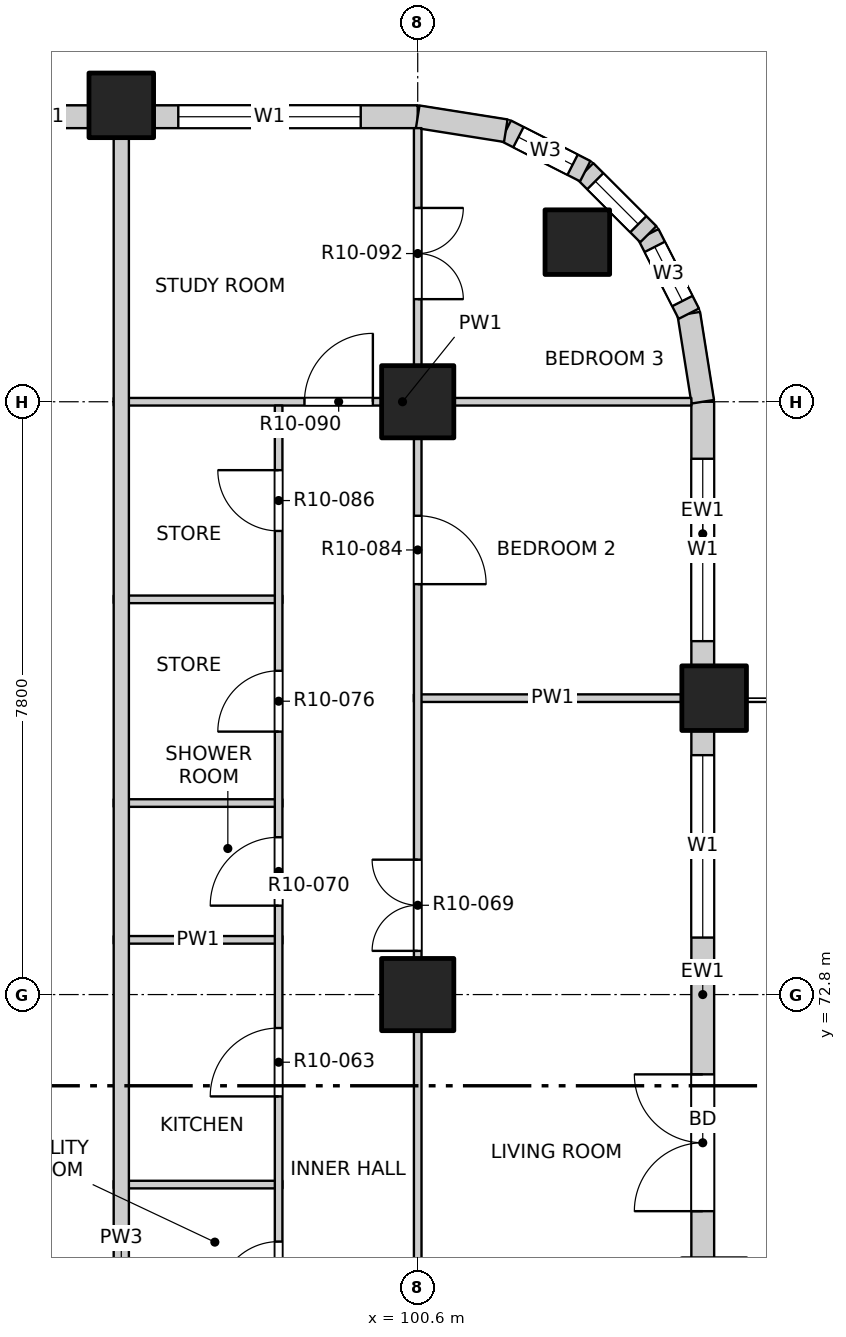
"""IFC4 building model, lengths in metres.
Left out: names, types, materials, properties, quantities, classifications, styles, units other than length and angle.
Written with IfcOpenShell. Run it as: python <this file> out.ifc"""

import sys

from ifc_helpers import new_model, si_unit, direction, frame, frame_2d, origin, origin_2d, place, context, subcontext, project, spatial, rectangle, extrude, element, fill, save


model = new_model("IFC4")
c1 = context("Model", 3, precision=1e-05, world=origin(), true_north=direction((0.0, 1.0)))
c2 = subcontext(c1, "Body", "Model", "MODEL_VIEW")
j1 = project(units=[si_unit("LENGTHUNIT", "METRE"), si_unit("PLANEANGLEUNIT", "RADIAN")], contexts=[c1])
p1 = place(None, origin())
s1 = spatial("IfcSite", under=j1, at=p1, CompositionType="ELEMENT")
p2 = place(p1, origin())
s2 = spatial("IfcBuilding", under=s1, at=p2, CompositionType="ELEMENT")
p3 = place(p2, frame((0.0, 0.0, 127.1)))
s3 = spatial("IfcBuildingStorey", under=s2, at=p3, CompositionType="ELEMENT", Elevation=127.1)
for number, where, z_axis, x_axis in (
    (1, (102.7, 82.7, -0.25), (0.0, 0.0, 1.0), (1.0, 0.0, 0.0)),
    (2, (104.5, 76.7, -0.25), (0.0, 0.0, 1.0), (1.0, 0.0, 0.0)),
    (3, (96.7, 84.5, -0.25), (0.0, 0.0, 1.0), (1.0, 0.0, 0.0)),
):
    element("IfcColumn", number, at=place(p3, frame(where, z_axis=z_axis, x_axis=x_axis)), inside=s3, PredefinedType="COLUMN", context=c2, shape_type="SweptSolid", body=[
        extrude(rectangle(XDim=0.85, YDim=0.85, at=origin_2d()), origin(), (0.0, 0.0, 1.0), 3.4),
    ])
for number, where, z_axis, x_axis in (
    (4, (100.6, 72.8, -0.25), (0.0, 0.0, 1.0), (1.0, 0.0, 0.0)),
    (5, (100.6, 80.6, -0.25), (0.0, 0.0, 1.0), (1.0, 0.0, 0.0)),
):
    element("IfcColumn", number, at=place(p3, frame(where, z_axis=z_axis, x_axis=x_axis)), inside=s3, PredefinedType="COLUMN", context=c2, shape_type="SweptSolid", body=[
        extrude(rectangle(XDim=0.95, YDim=0.95, at=origin_2d()), origin(), (0.0, 0.0, 1.0), 3.4),
    ])
p4 = place(p3, frame((104.35, 69.325, 0.0), z_axis=(0.0, 0.0, 1.0), x_axis=(0.0, 1.0, 0.0)))
e6 = element("IfcWall", 6, at=p4, inside=s3, PredefinedType="SOLIDWALL", context=c2, shape_type="SweptSolid", body=[
    extrude(rectangle(XDim=6.95, YDim=0.3, at=frame_2d((3.475, 0.0))), origin(), (0.0, 0.0, 1.0), 2.7),
])
p5 = place(p4, frame((0.625, 0.0, 0.0)))
e7 = element("IfcOpeningElement", 7, at=p5, cuts=e6, PredefinedType="OPENING", context=c2, shape_type="SweptSolid", body=[
    extrude(rectangle(XDim=1.8, YDim=2.4, at=frame_2d((0.9, 1.2))), frame((0.0, 0.16, 0.0), z_axis=(0.0, -1.0, 0.0), x_axis=(1.0, 0.0, 0.0)), (0.0, 0.0, 1.0), 0.32),
])
p6 = place(p4, frame((4.225, 0.0, 0.9)))
e8 = element("IfcOpeningElement", 8, at=p6, cuts=e6, PredefinedType="OPENING", context=c2, shape_type="SweptSolid", body=[
    extrude(rectangle(XDim=2.4, YDim=1.8, at=frame_2d((1.2, 0.9))), frame((0.0, 0.16, 0.0), z_axis=(0.0, -1.0, 0.0), x_axis=(1.0, 0.0, 0.0)), (0.0, 0.0, 1.0), 0.32),
])
p7 = place(p3, frame((104.35, 77.125, 0.0), z_axis=(0.0, 0.0, 1.0), x_axis=(0.0, 1.0, 0.0)))
e9 = element("IfcWall", 9, at=p7, inside=s3, PredefinedType="SOLIDWALL", context=c2, shape_type="SweptSolid", body=[
    extrude(rectangle(XDim=3.475, YDim=0.3, at=frame_2d((1.738, 0.0))), origin(), (0.0, 0.0, 1.0), 2.7),
])
p8 = place(p7, frame((0.325, 0.0, 0.9)))
e10 = element("IfcOpeningElement", 10, at=p8, cuts=e9, PredefinedType="OPENING", context=c2, shape_type="SweptSolid", body=[
    extrude(rectangle(XDim=2.4, YDim=1.8, at=frame_2d((1.2, 0.9))), frame((0.0, 0.16, 0.0), z_axis=(0.0, -1.0, 0.0), x_axis=(1.0, 0.0, 0.0)), (0.0, 0.0, 1.0), 0.32),
])
p9 = place(p3, frame((95.025, 84.35, 0.0), z_axis=(0.0, 0.0, 1.0), x_axis=(1.0, 0.0, 0.0)))
e11 = element("IfcWall", 11, at=p9, inside=s3, PredefinedType="SOLIDWALL", context=c2, shape_type="SweptSolid", body=[
    extrude(rectangle(XDim=1.25, YDim=0.3, at=frame_2d((0.625, 0.0))), origin(), (0.0, 0.0, 1.0), 2.7),
])
p10 = place(p3, frame((97.125, 84.35, 0.0), z_axis=(0.0, 0.0, 1.0), x_axis=(1.0, 0.0, 0.0)))
e12 = element("IfcWall", 12, at=p10, inside=s3, PredefinedType="SOLIDWALL", context=c2, shape_type="SweptSolid", body=[
    extrude(rectangle(XDim=3.475, YDim=0.3, at=frame_2d((1.738, 0.0))), origin(), (0.0, 0.0, 1.0), 2.7),
])
p11 = place(p10, frame((0.325, 0.0, 0.9)))
e13 = element("IfcOpeningElement", 13, at=p11, cuts=e12, PredefinedType="OPENING", context=c2, shape_type="SweptSolid", body=[
    extrude(rectangle(XDim=2.4, YDim=1.8, at=frame_2d((1.2, 0.9))), frame((0.0, 0.16, 0.0), z_axis=(0.0, -1.0, 0.0), x_axis=(1.0, 0.0, 0.0)), (0.0, 0.0, 1.0), 0.32),
])
p12 = place(p3, frame((104.35, 80.6, 0.0), z_axis=(0.0, 0.0, 1.0), x_axis=(-0.156496880861, 0.987678452879, 0.0)))
e14 = element("IfcWall", 14, at=p12, inside=s3, PredefinedType="SOLIDWALL", context=c2, shape_type="SweptSolid", body=[
    extrude(rectangle(XDim=1.173, YDim=0.3, at=frame_2d((0.586, 0.0))), origin(), (0.0, 0.0, 1.0), 2.7),
])
p13 = place(p3, frame((104.167, 81.759, 0.0), z_axis=(0.0, 0.0, 1.0), x_axis=(-0.454025524128, 0.890988677504, 0.0)))
e15 = element("IfcWall", 15, at=p13, inside=s3, PredefinedType="SOLIDWALL", context=c2, shape_type="SweptSolid", body=[
    extrude(rectangle(XDim=1.173, YDim=0.3, at=frame_2d((0.587, 0.0))), origin(), (0.0, 0.0, 1.0), 2.7),
])
p14 = place(p13, frame((0.187, 0.0, 0.9)))
e16 = element("IfcOpeningElement", 16, at=p14, cuts=e15, PredefinedType="OPENING", context=c2, shape_type="SweptSolid", body=[
    extrude(rectangle(XDim=0.8, YDim=1.2, at=frame_2d((0.4, 0.6))), frame((0.0, 0.16, 0.0), z_axis=(0.0, -1.0, 0.0), x_axis=(1.0, 0.0, 0.0)), (0.0, 0.0, 1.0), 0.32),
])
p15 = place(p3, frame((103.634, 82.804, 0.0), z_axis=(0.0, 0.0, 1.0), x_axis=(-0.707106781187, 0.707106781187, 0.0)))
e17 = element("IfcWall", 17, at=p15, inside=s3, PredefinedType="SOLIDWALL", context=c2, shape_type="SweptSolid", body=[
    extrude(rectangle(XDim=1.173, YDim=0.3, at=frame_2d((0.586, 0.0))), origin(), (0.0, 0.0, 1.0), 2.7),
])
p16 = place(p15, frame((0.187, 0.0, 0.9)))
e18 = element("IfcOpeningElement", 18, at=p16, cuts=e17, PredefinedType="OPENING", context=c2, shape_type="SweptSolid", body=[
    extrude(rectangle(XDim=0.8, YDim=1.2, at=frame_2d((0.4, 0.6))), frame((0.0, 0.16, 0.0), z_axis=(0.0, -1.0, 0.0), x_axis=(1.0, 0.0, 0.0)), (0.0, 0.0, 1.0), 0.32),
])
p17 = place(p3, frame((102.804, 83.634, 0.0), z_axis=(0.0, 0.0, 1.0), x_axis=(-0.890988677504, 0.454025524128, 0.0)))
e19 = element("IfcWall", 19, at=p17, inside=s3, PredefinedType="SOLIDWALL", context=c2, shape_type="SweptSolid", body=[
    extrude(rectangle(XDim=1.173, YDim=0.3, at=frame_2d((0.587, 0.0))), origin(), (0.0, 0.0, 1.0), 2.7),
])
p18 = place(p17, frame((0.187, 0.0, 0.9)))
e20 = element("IfcOpeningElement", 20, at=p18, cuts=e19, PredefinedType="OPENING", context=c2, shape_type="SweptSolid", body=[
    extrude(rectangle(XDim=0.8, YDim=1.2, at=frame_2d((0.4, 0.6))), frame((0.0, 0.16, 0.0), z_axis=(0.0, -1.0, 0.0), x_axis=(1.0, 0.0, 0.0)), (0.0, 0.0, 1.0), 0.32),
])
p19 = place(p3, frame((101.759, 84.167, 0.0), z_axis=(0.0, 0.0, 1.0), x_axis=(-0.987678452879, 0.156496880861, 0.0)))
e21 = element("IfcWall", 21, at=p19, inside=s3, PredefinedType="SOLIDWALL", context=c2, shape_type="SweptSolid", body=[
    extrude(rectangle(XDim=1.173, YDim=0.3, at=frame_2d((0.586, 0.0))), origin(), (0.0, 0.0, 1.0), 2.7),
])
for number, where, z_axis, x_axis in (
    (22, (96.6, 70.3, 0.0), (0.0, 0.0, 1.0), (1.0, 0.0, 0.0)),
    (23, (96.6, 73.52, 0.0), (0.0, 0.0, 1.0), (1.0, 0.0, 0.0)),
    (24, (96.6, 75.32, 0.0), (0.0, 0.0, 1.0), (1.0, 0.0, 0.0)),
):
    element("IfcWall", number, at=place(p3, frame(where, z_axis=z_axis, x_axis=x_axis)), inside=s3, PredefinedType="PARTITIONING", context=c2, shape_type="SweptSolid", body=[
        extrude(rectangle(XDim=2.22, YDim=0.1, at=frame_2d((1.11, 0.0))), origin(), (0.0, 0.0, 1.0), 3.15),
    ])
p20 = place(p3, frame((100.55, 76.7, 0.0), z_axis=(0.0, 0.0, 1.0), x_axis=(1.0, 0.0, 0.0)))
e25 = element("IfcWall", 25, at=p20, inside=s3, PredefinedType="PARTITIONING", context=c2, shape_type="SweptSolid", body=[
    extrude(rectangle(XDim=3.65, YDim=0.1, at=frame_2d((1.825, 0.0))), origin(), (0.0, 0.0, 1.0), 2.55),
])
p21 = place(p3, frame((96.6, 78.0, 0.0), z_axis=(0.0, 0.0, 1.0), x_axis=(1.0, 0.0, 0.0)))
e26 = element("IfcWall", 26, at=p21, inside=s3, PredefinedType="PARTITIONING", context=c2, shape_type="SweptSolid", body=[
    extrude(rectangle(XDim=2.22, YDim=0.1, at=frame_2d((1.11, 0.0))), origin(), (0.0, 0.0, 1.0), 3.15),
])
p22 = place(p3, frame((96.6, 80.6, 0.0), z_axis=(0.0, 0.0, 1.0), x_axis=(1.0, 0.0, 0.0)))
e27 = element("IfcWall", 27, at=p22, inside=s3, PredefinedType="PARTITIONING", context=c2, shape_type="SweptSolid", body=[
    extrude(rectangle(XDim=7.6, YDim=0.1, at=frame_2d((3.8, 0.0))), origin(), (0.0, 0.0, 1.0), 3.15),
])
p23 = place(p22, frame((2.51, 0.0, 0.0)))
e28 = element("IfcOpeningElement", 28, at=p23, cuts=e27, PredefinedType="OPENING", context=c2, shape_type="SweptSolid", body=[
    extrude(rectangle(XDim=0.9, YDim=2.1, at=frame_2d((0.45, 1.05))), frame((0.0, 0.06, 0.0), z_axis=(0.0, -1.0, 0.0), x_axis=(1.0, 0.0, 0.0)), (0.0, 0.0, 1.0), 0.12),
])
p24 = place(p3, frame((96.7, 53.4, 0.0), z_axis=(0.0, 0.0, 1.0), x_axis=(0.0, 1.0, 0.0)))
e29 = element("IfcWall", 29, at=p24, inside=s3, PredefinedType="PARTITIONING", context=c2, shape_type="SweptSolid", body=[
    extrude(rectangle(XDim=30.8, YDim=0.2, at=frame_2d((15.4, 0.0))), origin(), (0.0, 0.0, 1.0), 3.15),
])
p25 = place(p24, frame((9.725, 0.0, 0.0)))
e30 = element("IfcOpeningElement", 30, at=p25, cuts=e29, PredefinedType="OPENING", context=c2, shape_type="SweptSolid", body=[
    extrude(rectangle(XDim=1.0, YDim=2.1, at=frame_2d((0.5, 1.05))), frame((0.0, 0.11, 0.0), z_axis=(0.0, -1.0, 0.0), x_axis=(1.0, 0.0, 0.0)), (0.0, 0.0, 1.0), 0.22),
])
p26 = place(p24, frame((14.775, 0.0, 0.0)))
e31 = element("IfcOpeningElement", 31, at=p26, cuts=e29, PredefinedType="OPENING", context=c2, shape_type="SweptSolid", body=[
    extrude(rectangle(XDim=1.0, YDim=2.1, at=frame_2d((0.5, 1.05))), frame((0.0, 0.11, 0.0), z_axis=(0.0, -1.0, 0.0), x_axis=(1.0, 0.0, 0.0)), (0.0, 0.0, 1.0), 0.22),
])
p27 = place(p3, frame((98.77, 68.05, 0.0), z_axis=(0.0, 0.0, 1.0), x_axis=(0.0, 1.0, 0.0)))
e32 = element("IfcWall", 32, at=p27, inside=s3, PredefinedType="PARTITIONING", context=c2, shape_type="SweptSolid", body=[
    extrude(rectangle(XDim=12.5, YDim=0.1, at=frame_2d((6.25, 0.0))), origin(), (0.0, 0.0, 1.0), 3.15),
])
p28 = place(p27, frame((0.7, 0.0, 0.0)))
e33 = element("IfcOpeningElement", 33, at=p28, cuts=e32, PredefinedType="OPENING", context=c2, shape_type="SweptSolid", body=[
    extrude(rectangle(XDim=0.8, YDim=2.1, at=frame_2d((0.4, 1.05))), frame((0.0, 0.06, 0.0), z_axis=(0.0, -1.0, 0.0), x_axis=(1.0, 0.0, 0.0)), (0.0, 0.0, 1.0), 0.12),
])
p29 = place(p27, frame((3.41, 0.0, 0.0)))
e34 = element("IfcOpeningElement", 34, at=p29, cuts=e32, PredefinedType="OPENING", context=c2, shape_type="SweptSolid", body=[
    extrude(rectangle(XDim=0.9, YDim=2.1, at=frame_2d((0.45, 1.05))), frame((0.0, 0.06, 0.0), z_axis=(0.0, -1.0, 0.0), x_axis=(1.0, 0.0, 0.0)), (0.0, 0.0, 1.0), 0.12),
])
p30 = place(p27, frame((5.92, 0.0, 0.0)))
e35 = element("IfcOpeningElement", 35, at=p30, cuts=e32, PredefinedType="OPENING", context=c2, shape_type="SweptSolid", body=[
    extrude(rectangle(XDim=0.9, YDim=2.1, at=frame_2d((0.45, 1.05))), frame((0.0, 0.06, 0.0), z_axis=(0.0, -1.0, 0.0), x_axis=(1.0, 0.0, 0.0)), (0.0, 0.0, 1.0), 0.12),
])
p31 = place(p27, frame((8.21, 0.0, 0.0)))
e36 = element("IfcOpeningElement", 36, at=p31, cuts=e32, PredefinedType="OPENING", context=c2, shape_type="SweptSolid", body=[
    extrude(rectangle(XDim=0.8, YDim=2.1, at=frame_2d((0.4, 1.05))), frame((0.0, 0.06, 0.0), z_axis=(0.0, -1.0, 0.0), x_axis=(1.0, 0.0, 0.0)), (0.0, 0.0, 1.0), 0.12),
])
p32 = place(p27, frame((10.85, 0.0, 0.0)))
e37 = element("IfcOpeningElement", 37, at=p32, cuts=e32, PredefinedType="OPENING", context=c2, shape_type="SweptSolid", body=[
    extrude(rectangle(XDim=0.8, YDim=2.1, at=frame_2d((0.4, 1.05))), frame((0.0, 0.06, 0.0), z_axis=(0.0, -1.0, 0.0), x_axis=(1.0, 0.0, 0.0)), (0.0, 0.0, 1.0), 0.12),
])
p33 = place(p3, frame((100.6, 45.8, 0.0), z_axis=(0.0, 0.0, 1.0), x_axis=(0.0, 1.0, 0.0)))
e38 = element("IfcWall", 38, at=p33, inside=s3, PredefinedType="PARTITIONING", context=c2, shape_type="SweptSolid", body=[
    extrude(rectangle(XDim=38.4, YDim=0.1, at=frame_2d((19.2, 0.0))), origin(), (0.0, 0.0, 1.0), 3.15),
])
p34 = place(p33, frame((1.05, 0.0, 0.0)))
e39 = element("IfcOpeningElement", 39, at=p34, cuts=e38, PredefinedType="OPENING", context=c2, shape_type="SweptSolid", body=[
    extrude(rectangle(XDim=1.2, YDim=2.1, at=frame_2d((0.6, 1.05))), frame((0.0, 0.06, 0.0), z_axis=(0.0, -1.0, 0.0), x_axis=(1.0, 0.0, 0.0)), (0.0, 0.0, 1.0), 0.12),
])
p35 = place(p33, frame((6.9, 0.0, 0.0)))
e40 = element("IfcOpeningElement", 40, at=p35, cuts=e38, PredefinedType="OPENING", context=c2, shape_type="SweptSolid", body=[
    extrude(rectangle(XDim=1.2, YDim=2.1, at=frame_2d((0.6, 1.05))), frame((0.0, 0.06, 0.0), z_axis=(0.0, -1.0, 0.0), x_axis=(1.0, 0.0, 0.0)), (0.0, 0.0, 1.0), 0.12),
])
p36 = place(p33, frame((12.9, 0.0, 0.0)))
e41 = element("IfcOpeningElement", 41, at=p36, cuts=e38, PredefinedType="OPENING", context=c2, shape_type="SweptSolid", body=[
    extrude(rectangle(XDim=0.9, YDim=2.1, at=frame_2d((0.45, 1.05))), frame((0.0, 0.06, 0.0), z_axis=(0.0, -1.0, 0.0), x_axis=(1.0, 0.0, 0.0)), (0.0, 0.0, 1.0), 0.12),
])
p37 = place(p33, frame((16.8, 0.0, 0.0)))
e42 = element("IfcOpeningElement", 42, at=p37, cuts=e38, PredefinedType="OPENING", context=c2, shape_type="SweptSolid", body=[
    extrude(rectangle(XDim=0.9, YDim=2.1, at=frame_2d((0.45, 1.05))), frame((0.0, 0.06, 0.0), z_axis=(0.0, -1.0, 0.0), x_axis=(1.0, 0.0, 0.0)), (0.0, 0.0, 1.0), 0.12),
])
p38 = place(p33, frame((20.7, 0.0, 0.0)))
e43 = element("IfcOpeningElement", 43, at=p38, cuts=e38, PredefinedType="OPENING", context=c2, shape_type="SweptSolid", body=[
    extrude(rectangle(XDim=0.9, YDim=2.1, at=frame_2d((0.45, 1.05))), frame((0.0, 0.06, 0.0), z_axis=(0.0, -1.0, 0.0), x_axis=(1.0, 0.0, 0.0)), (0.0, 0.0, 1.0), 0.12),
])
p39 = place(p33, frame((27.575, 0.0, 0.0)))
e44 = element("IfcOpeningElement", 44, at=p39, cuts=e38, PredefinedType="OPENING", context=c2, shape_type="SweptSolid", body=[
    extrude(rectangle(XDim=1.2, YDim=2.1, at=frame_2d((0.6, 1.05))), frame((0.0, 0.06, 0.0), z_axis=(0.0, -1.0, 0.0), x_axis=(1.0, 0.0, 0.0)), (0.0, 0.0, 1.0), 0.12),
])
p40 = place(p33, frame((32.4, 0.0, 0.0)))
e45 = element("IfcOpeningElement", 45, at=p40, cuts=e38, PredefinedType="OPENING", context=c2, shape_type="SweptSolid", body=[
    extrude(rectangle(XDim=0.9, YDim=2.1, at=frame_2d((0.45, 1.05))), frame((0.0, 0.06, 0.0), z_axis=(0.0, -1.0, 0.0), x_axis=(1.0, 0.0, 0.0)), (0.0, 0.0, 1.0), 0.12),
])
p41 = place(p33, frame((36.15, 0.0, 0.0)))
e46 = element("IfcOpeningElement", 46, at=p41, cuts=e38, PredefinedType="OPENING", context=c2, shape_type="SweptSolid", body=[
    extrude(rectangle(XDim=1.2, YDim=2.1, at=frame_2d((0.6, 1.05))), frame((0.0, 0.06, 0.0), z_axis=(0.0, -1.0, 0.0), x_axis=(1.0, 0.0, 0.0)), (0.0, 0.0, 1.0), 0.12),
])
p42 = place(p5, origin())
e47 = element("IfcDoor", 47, at=p42, inside=s3, OperationType="DOUBLE_DOOR_SINGLE_SWING", PredefinedType="DOOR", context=c2, shape_type="SweptSolid", body=[
    extrude(rectangle(XDim=1.8, YDim=2.4, at=frame_2d((0.9, 1.2))), frame((0.0, 0.025, 0.0), z_axis=(0.0, -1.0, 0.0), x_axis=(1.0, 0.0, 0.0)), (0.0, 0.0, 1.0), 0.05),
])
fill(e7, e47)
p43 = place(p6, origin())
e48 = element("IfcWindow", 48, at=p43, inside=s3, PartitioningType="DOUBLE_PANEL_VERTICAL", PredefinedType="WINDOW", context=c2, shape_type="SweptSolid", body=[
    extrude(rectangle(XDim=2.4, YDim=1.8, at=frame_2d((1.2, 0.9))), frame((0.0, 0.03, 0.0), z_axis=(0.0, -1.0, 0.0), x_axis=(1.0, 0.0, 0.0)), (0.0, 0.0, 1.0), 0.06),
])
fill(e8, e48)
p44 = place(p8, origin())
e49 = element("IfcWindow", 49, at=p44, inside=s3, PartitioningType="DOUBLE_PANEL_VERTICAL", PredefinedType="WINDOW", context=c2, shape_type="SweptSolid", body=[
    extrude(rectangle(XDim=2.4, YDim=1.8, at=frame_2d((1.2, 0.9))), frame((0.0, 0.03, 0.0), z_axis=(0.0, -1.0, 0.0), x_axis=(1.0, 0.0, 0.0)), (0.0, 0.0, 1.0), 0.06),
])
fill(e10, e49)
p45 = place(p11, origin())
e50 = element("IfcWindow", 50, at=p45, inside=s3, PartitioningType="DOUBLE_PANEL_VERTICAL", PredefinedType="WINDOW", context=c2, shape_type="SweptSolid", body=[
    extrude(rectangle(XDim=2.4, YDim=1.8, at=frame_2d((1.2, 0.9))), frame((0.0, 0.03, 0.0), z_axis=(0.0, -1.0, 0.0), x_axis=(1.0, 0.0, 0.0)), (0.0, 0.0, 1.0), 0.06),
])
fill(e13, e50)
p46 = place(p14, origin())
e51 = element("IfcWindow", 51, at=p46, inside=s3, PartitioningType="SINGLE_PANEL", PredefinedType="WINDOW", context=c2, shape_type="SweptSolid", body=[
    extrude(rectangle(XDim=0.8, YDim=1.2, at=frame_2d((0.4, 0.6))), frame((0.0, 0.03, 0.0), z_axis=(0.0, -1.0, 0.0), x_axis=(1.0, 0.0, 0.0)), (0.0, 0.0, 1.0), 0.06),
])
fill(e16, e51)
p47 = place(p16, origin())
e52 = element("IfcWindow", 52, at=p47, inside=s3, PartitioningType="SINGLE_PANEL", PredefinedType="WINDOW", context=c2, shape_type="SweptSolid", body=[
    extrude(rectangle(XDim=0.8, YDim=1.2, at=frame_2d((0.4, 0.6))), frame((0.0, 0.03, 0.0), z_axis=(0.0, -1.0, 0.0), x_axis=(1.0, 0.0, 0.0)), (0.0, 0.0, 1.0), 0.06),
])
fill(e18, e52)
p48 = place(p18, origin())
e53 = element("IfcWindow", 53, at=p48, inside=s3, PartitioningType="SINGLE_PANEL", PredefinedType="WINDOW", context=c2, shape_type="SweptSolid", body=[
    extrude(rectangle(XDim=0.8, YDim=1.2, at=frame_2d((0.4, 0.6))), frame((0.0, 0.03, 0.0), z_axis=(0.0, -1.0, 0.0), x_axis=(1.0, 0.0, 0.0)), (0.0, 0.0, 1.0), 0.06),
])
fill(e20, e53)
p49 = place(p28, origin())
e54 = element("IfcDoor", 54, at=p49, inside=s3, OperationType="SINGLE_SWING_LEFT", PredefinedType="DOOR", context=c2, shape_type="SweptSolid", body=[
    extrude(rectangle(XDim=0.8, YDim=2.1, at=frame_2d((0.4, 1.05))), frame((0.0, 0.025, 0.0), z_axis=(0.0, -1.0, 0.0), x_axis=(1.0, 0.0, 0.0)), (0.0, 0.0, 1.0), 0.05),
])
fill(e33, e54)
p50 = place(p29, origin())
e55 = element("IfcDoor", 55, at=p50, inside=s3, OperationType="SINGLE_SWING_LEFT", PredefinedType="DOOR", context=c2, shape_type="SweptSolid", body=[
    extrude(rectangle(XDim=0.9, YDim=2.1, at=frame_2d((0.45, 1.05))), frame((0.0, 0.025, 0.0), z_axis=(0.0, -1.0, 0.0), x_axis=(1.0, 0.0, 0.0)), (0.0, 0.0, 1.0), 0.05),
])
fill(e34, e55)
p51 = place(p39, origin())
e56 = element("IfcDoor", 56, at=p51, inside=s3, OperationType="DOUBLE_DOOR_SINGLE_SWING", PredefinedType="DOOR", context=c2, shape_type="SweptSolid", body=[
    extrude(rectangle(XDim=1.2, YDim=2.1, at=frame_2d((0.6, 1.05))), frame((0.0, 0.025, 0.0), z_axis=(0.0, -1.0, 0.0), x_axis=(1.0, 0.0, 0.0)), (0.0, 0.0, 1.0), 0.05),
])
fill(e44, e56)
p52 = place(p30, origin())
e57 = element("IfcDoor", 57, at=p52, inside=s3, OperationType="SINGLE_SWING_LEFT", PredefinedType="DOOR", context=c2, shape_type="SweptSolid", body=[
    extrude(rectangle(XDim=0.9, YDim=2.1, at=frame_2d((0.45, 1.05))), frame((0.0, 0.025, 0.0), z_axis=(0.0, -1.0, 0.0), x_axis=(1.0, 0.0, 0.0)), (0.0, 0.0, 1.0), 0.05),
])
fill(e35, e57)
p53 = place(p31, origin())
e58 = element("IfcDoor", 58, at=p53, inside=s3, OperationType="SINGLE_SWING_LEFT", PredefinedType="DOOR", context=c2, shape_type="SweptSolid", body=[
    extrude(rectangle(XDim=0.8, YDim=2.1, at=frame_2d((0.4, 1.05))), frame((0.0, 0.025, 0.0), z_axis=(0.0, -1.0, 0.0), x_axis=(1.0, 0.0, 0.0)), (0.0, 0.0, 1.0), 0.05),
])
fill(e36, e58)
p54 = place(p40, origin())
e59 = element("IfcDoor", 59, at=p54, inside=s3, OperationType="SINGLE_SWING_RIGHT", PredefinedType="DOOR", context=c2, shape_type="SweptSolid", body=[
    extrude(rectangle(XDim=0.9, YDim=2.1, at=frame_2d((0.45, 1.05))), frame((0.0, 0.025, 0.0), z_axis=(0.0, -1.0, 0.0), x_axis=(1.0, 0.0, 0.0)), (0.0, 0.0, 1.0), 0.05),
])
fill(e45, e59)
p55 = place(p32, origin())
e60 = element("IfcDoor", 60, at=p55, inside=s3, OperationType="SINGLE_SWING_RIGHT", PredefinedType="DOOR", context=c2, shape_type="SweptSolid", body=[
    extrude(rectangle(XDim=0.8, YDim=2.1, at=frame_2d((0.4, 1.05))), frame((0.0, 0.025, 0.0), z_axis=(0.0, -1.0, 0.0), x_axis=(1.0, 0.0, 0.0)), (0.0, 0.0, 1.0), 0.05),
])
fill(e37, e60)
p56 = place(p23, origin())
e61 = element("IfcDoor", 61, at=p56, inside=s3, OperationType="SINGLE_SWING_RIGHT", PredefinedType="DOOR", context=c2, shape_type="SweptSolid", body=[
    extrude(rectangle(XDim=0.9, YDim=2.1, at=frame_2d((0.45, 1.05))), frame((0.0, 0.025, 0.0), z_axis=(0.0, -1.0, 0.0), x_axis=(1.0, 0.0, 0.0)), (0.0, 0.0, 1.0), 0.05),
])
fill(e28, e61)
p57 = place(p41, origin())
e62 = element("IfcDoor", 62, at=p57, inside=s3, OperationType="DOUBLE_DOOR_SINGLE_SWING", PredefinedType="DOOR", context=c2, shape_type="SweptSolid", body=[
    extrude(rectangle(XDim=1.2, YDim=2.1, at=frame_2d((0.6, 1.05))), frame((0.0, 0.025, 0.0), z_axis=(0.0, -1.0, 0.0), x_axis=(1.0, 0.0, 0.0)), (0.0, 0.0, 1.0), 0.05),
])
fill(e46, e62)
save(model, sys.argv[1])
